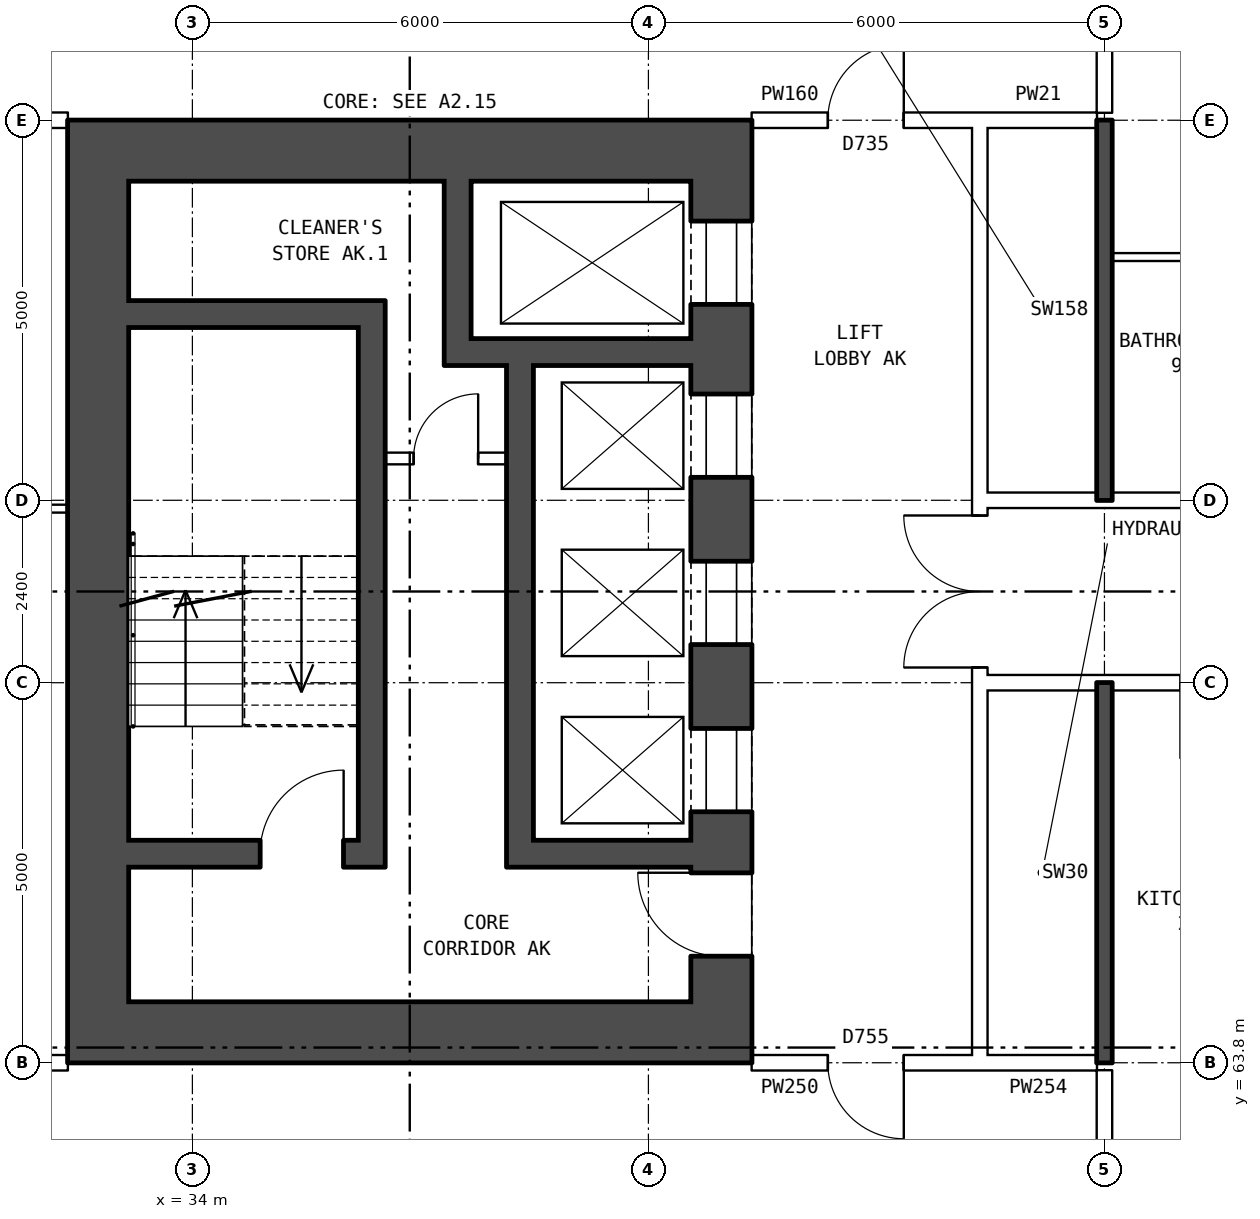
"""IFC4 building model, lengths in metres.
Left out: names, types, materials, properties, quantities, classifications, styles, units other than length and angle.
Written with IfcOpenShell. Run it as: python <this file> out.ifc"""

import sys

from ifc_helpers import new_model, si_unit, direction, frame, frame_2d, origin, place, context, subcontext, project, spatial, rectangle, extrude, element, fill, save


model = new_model("IFC4")
c1 = context("Model", 3, precision=1e-05, world=origin(), true_north=direction((0.0, 1.0)))
c2 = subcontext(c1, "Body", "Model", "MODEL_VIEW")
j1 = project(units=[si_unit("LENGTHUNIT", "METRE"), si_unit("PLANEANGLEUNIT", "RADIAN")], contexts=[c1])
p1 = place(None, origin())
s1 = spatial("IfcSite", under=j1, at=p1, CompositionType="ELEMENT")
p2 = place(p1, origin())
s2 = spatial("IfcBuilding", under=s1, at=p2, CompositionType="ELEMENT")
p3 = place(p2, frame((0.0, 0.0, 53.6)))
s3 = spatial("IfcBuildingStorey", under=s2, at=p3, CompositionType="ELEMENT", Elevation=53.6)
p4 = place(p3, frame((40.96, 75.4, 0.0), z_axis=(0.0, 0.0, 1.0), x_axis=(0.0, -1.0, 0.0)))
e1 = element("IfcWall", 1, at=p4, inside=s3, PredefinedType="SHEAR", context=c2, shape_type="SweptSolid", body=[
    extrude(rectangle(XDim=10.8, YDim=0.8, at=frame_2d((5.4, 0.0))), origin(), (0.0, 0.0, 1.0), 2.85),
])
p5 = place(p4, frame((0.525, 0.0, 0.0)))
e2 = element("IfcOpeningElement", 2, at=p5, cuts=e1, PredefinedType="OPENING", context=c2, shape_type="SweptSolid", body=[
    extrude(rectangle(XDim=1.1, YDim=2.1, at=frame_2d((0.55, 1.05))), frame((0.0, 0.41, 0.0), z_axis=(0.0, -1.0, 0.0), x_axis=(1.0, 0.0, 0.0)), (0.0, 0.0, 1.0), 0.82),
])
p6 = place(p4, frame((2.8, 0.0, 0.0)))
e3 = element("IfcOpeningElement", 3, at=p6, cuts=e1, PredefinedType="OPENING", context=c2, shape_type="SweptSolid", body=[
    extrude(rectangle(XDim=1.1, YDim=2.1, at=frame_2d((0.55, 1.05))), frame((0.0, 0.41, 0.0), z_axis=(0.0, -1.0, 0.0), x_axis=(1.0, 0.0, 0.0)), (0.0, 0.0, 1.0), 0.82),
])
p7 = place(p4, frame((5.0, 0.0, 0.0)))
e4 = element("IfcOpeningElement", 4, at=p7, cuts=e1, PredefinedType="OPENING", context=c2, shape_type="SweptSolid", body=[
    extrude(rectangle(XDim=1.1, YDim=2.1, at=frame_2d((0.55, 1.05))), frame((0.0, 0.41, 0.0), z_axis=(0.0, -1.0, 0.0), x_axis=(1.0, 0.0, 0.0)), (0.0, 0.0, 1.0), 0.82),
])
p8 = place(p4, frame((7.2, 0.0, 0.0)))
e5 = element("IfcOpeningElement", 5, at=p8, cuts=e1, PredefinedType="OPENING", context=c2, shape_type="SweptSolid", body=[
    extrude(rectangle(XDim=1.1, YDim=2.1, at=frame_2d((0.55, 1.05))), frame((0.0, 0.41, 0.0), z_axis=(0.0, -1.0, 0.0), x_axis=(1.0, 0.0, 0.0)), (0.0, 0.0, 1.0), 0.82),
])
p9 = place(p4, frame((9.1, 0.0, 0.0)))
e6 = element("IfcOpeningElement", 6, at=p9, cuts=e1, PredefinedType="OPENING", context=c2, shape_type="SweptSolid", body=[
    extrude(rectangle(XDim=1.1, YDim=2.1, at=frame_2d((0.55, 1.05))), frame((0.0, 0.41, 0.0), z_axis=(0.0, -1.0, 0.0), x_axis=(1.0, 0.0, 0.0)), (0.0, 0.0, 1.0), 0.82),
])
p10 = place(p3, frame((32.76, 75.4, 0.0), z_axis=(0.0, 0.0, 1.0), x_axis=(0.0, -1.0, 0.0)))
e7 = element("IfcWall", 7, at=p10, inside=s3, PredefinedType="SHEAR", context=c2, shape_type="SweptSolid", body=[
    extrude(rectangle(XDim=10.8, YDim=0.8, at=frame_2d((5.4, 0.0))), origin(), (0.0, 0.0, 1.0), 2.85),
])
for number, where, z_axis, x_axis in (
    (8, (41.36, 75.8, 0.0), (0.0, 0.0, 1.0), (-1.0, 0.0, 0.0)),
    (9, (41.36, 64.2, 0.0), (0.0, 0.0, 1.0), (-1.0, 0.0, 0.0)),
):
    element("IfcWall", number, at=place(p3, frame(where, z_axis=z_axis, x_axis=x_axis)), inside=s3, PredefinedType="SHEAR", context=c2, shape_type="SweptSolid", body=[
        extrude(rectangle(XDim=9.0, YDim=0.8, at=frame_2d((4.5, 0.0))), origin(), (0.0, 0.0, 1.0), 2.85),
    ])
p11 = place(p3, frame((36.185, 73.65, 0.0), z_axis=(0.0, 0.0, 1.0), x_axis=(-1.0, 0.0, 0.0)))
e10 = element("IfcWall", 10, at=p11, inside=s3, PredefinedType="SHEAR", context=c2, shape_type="SweptSolid", body=[
    extrude(rectangle(XDim=3.025, YDim=0.35, at=frame_2d((1.513, 0.0))), origin(), (0.0, 0.0, 1.0), 2.85),
])
p12 = place(p3, frame((40.56, 73.15, 0.0), z_axis=(0.0, 0.0, 1.0), x_axis=(-1.0, 0.0, 0.0)))
e11 = element("IfcWall", 11, at=p12, inside=s3, PredefinedType="SHEAR", context=c2, shape_type="SweptSolid", body=[
    extrude(rectangle(XDim=3.245, YDim=0.35, at=frame_2d((1.623, 0.0))), origin(), (0.0, 0.0, 1.0), 2.85),
])
p13 = place(p3, frame((38.135, 71.75, 0.0), z_axis=(0.0, 0.0, 1.0), x_axis=(-1.0, 0.0, 0.0)))
e12 = element("IfcWall", 12, at=p13, inside=s3, PredefinedType="PARTITIONING", context=c2, shape_type="SweptSolid", body=[
    extrude(rectangle(XDim=1.6, YDim=0.15, at=frame_2d((0.8, 0.0))), origin(), (0.0, 0.0, 1.0), 2.85),
])
p14 = place(p13, frame((0.375, 0.0, 0.0)))
e13 = element("IfcOpeningElement", 13, at=p14, cuts=e12, PredefinedType="OPENING", context=c2, shape_type="SweptSolid", body=[
    extrude(rectangle(XDim=0.85, YDim=2.1, at=frame_2d((0.425, 1.05))), frame((0.0, 0.085, 0.0), z_axis=(0.0, -1.0, 0.0), x_axis=(1.0, 0.0, 0.0)), (0.0, 0.0, 1.0), 0.17),
])
p15 = place(p3, frame((40.56, 66.55, 0.0), z_axis=(0.0, 0.0, 1.0), x_axis=(-1.0, 0.0, 0.0)))
e14 = element("IfcWall", 14, at=p15, inside=s3, PredefinedType="SHEAR", context=c2, shape_type="SweptSolid", body=[
    extrude(rectangle(XDim=2.075, YDim=0.35, at=frame_2d((1.038, 0.0))), origin(), (0.0, 0.0, 1.0), 2.85),
])
p16 = place(p3, frame((36.185, 66.55, 0.0), z_axis=(0.0, 0.0, 1.0), x_axis=(-1.0, 0.0, 0.0)))
e15 = element("IfcWall", 15, at=p16, inside=s3, PredefinedType="SHEAR", context=c2, shape_type="SweptSolid", body=[
    extrude(rectangle(XDim=3.025, YDim=0.35, at=frame_2d((1.513, 0.0))), origin(), (0.0, 0.0, 1.0), 2.85),
])
p17 = place(p16, frame((0.195, 0.0, 0.0)))
e16 = element("IfcOpeningElement", 16, at=p17, cuts=e15, PredefinedType="OPENING", context=c2, shape_type="SweptSolid", body=[
    extrude(rectangle(XDim=1.1, YDim=2.1, at=frame_2d((0.55, 1.05))), frame((0.0, 0.185, 0.0), z_axis=(0.0, -1.0, 0.0), x_axis=(1.0, 0.0, 0.0)), (0.0, 0.0, 1.0), 0.37),
])
p18 = place(p3, frame((38.31, 72.975, 0.0), z_axis=(0.0, 0.0, 1.0), x_axis=(0.0, -1.0, 0.0)))
e17 = element("IfcWall", 17, at=p18, inside=s3, PredefinedType="SHEAR", context=c2, shape_type="SweptSolid", body=[
    extrude(rectangle(XDim=6.6, YDim=0.35, at=frame_2d((3.3, 0.0))), origin(), (0.0, 0.0, 1.0), 2.85),
])
p19 = place(p3, frame((37.49, 75.4, 0.0), z_axis=(0.0, 0.0, 1.0), x_axis=(0.0, -1.0, 0.0)))
e18 = element("IfcWall", 18, at=p19, inside=s3, PredefinedType="SHEAR", context=c2, shape_type="SweptSolid", body=[
    extrude(rectangle(XDim=2.075, YDim=0.35, at=frame_2d((1.038, 0.0))), origin(), (0.0, 0.0, 1.0), 2.85),
])
p20 = place(p3, frame((36.36, 73.825, 0.0), z_axis=(0.0, 0.0, 1.0), x_axis=(0.0, -1.0, 0.0)))
e19 = element("IfcWall", 19, at=p20, inside=s3, PredefinedType="SHEAR", context=c2, shape_type="SweptSolid", body=[
    extrude(rectangle(XDim=7.45, YDim=0.35, at=frame_2d((3.725, 0.0))), origin(), (0.0, 0.0, 1.0), 2.85),
])
p21 = place(p3, frame((44.36, 63.9, 0.0), z_axis=(0.0, 0.0, 1.0), x_axis=(0.0, 1.0, 0.0)))
e20 = element("IfcWall", 20, at=p21, inside=s3, PredefinedType="PARTITIONING", context=c2, shape_type="SweptSolid", body=[
    extrude(rectangle(XDim=12.2, YDim=0.2, at=frame_2d((6.1, 0.0))), origin(), (0.0, 0.0, 1.0), 2.85),
])
p22 = place(p21, frame((5.1, 0.0, 0.0)))
e21 = element("IfcOpeningElement", 21, at=p22, cuts=e20, PredefinedType="OPENING", context=c2, shape_type="SweptSolid", body=[
    extrude(rectangle(XDim=2.0, YDim=2.1, at=frame_2d((1.0, 1.05))), frame((0.0, 0.11, 0.0), z_axis=(0.0, -1.0, 0.0), x_axis=(1.0, 0.0, 0.0)), (0.0, 0.0, 1.0), 0.22),
])
p23 = place(p3, frame((24.26, 63.8, 0.0), z_axis=(0.0, 0.0, 1.0), x_axis=(1.0, 0.0, 0.0)))
e22 = element("IfcWall", 22, at=p23, inside=s3, PredefinedType="PARTITIONING", context=c2, shape_type="SweptSolid", body=[
    extrude(rectangle(XDim=8.1, YDim=0.2, at=frame_2d((4.05, 0.0))), origin(), (0.0, 0.0, 1.0), 2.85),
])
p24 = place(p23, frame((5.52, 0.0, 0.0)))
e23 = element("IfcOpeningElement", 23, at=p24, cuts=e22, PredefinedType="OPENING", context=c2, shape_type="SweptSolid", body=[
    extrude(rectangle(XDim=0.8, YDim=2.1, at=frame_2d((0.4, 1.05))), frame((0.0, 0.11, 0.0), z_axis=(0.0, -1.0, 0.0), x_axis=(1.0, 0.0, 0.0)), (0.0, 0.0, 1.0), 0.22),
])
p25 = place(p3, frame((41.36, 63.8, 0.0), z_axis=(0.0, 0.0, 1.0), x_axis=(1.0, 0.0, 0.0)))
e24 = element("IfcWall", 24, at=p25, inside=s3, PredefinedType="PARTITIONING", context=c2, shape_type="SweptSolid", body=[
    extrude(rectangle(XDim=3.0, YDim=0.2, at=frame_2d((1.5, 0.0))), origin(), (0.0, 0.0, 1.0), 2.85),
])
p26 = place(p25, frame((1.0, 0.0, 0.0)))
e25 = element("IfcOpeningElement", 25, at=p26, cuts=e24, PredefinedType="OPENING", context=c2, shape_type="SweptSolid", body=[
    extrude(rectangle(XDim=1.0, YDim=2.1, at=frame_2d((0.5, 1.05))), frame((0.0, 0.11, 0.0), z_axis=(0.0, -1.0, 0.0), x_axis=(1.0, 0.0, 0.0)), (0.0, 0.0, 1.0), 0.22),
])
p27 = place(p3, frame((44.36, 63.8, 0.0), z_axis=(0.0, 0.0, 1.0), x_axis=(1.0, 0.0, 0.0)))
e26 = element("IfcWall", 26, at=p27, inside=s3, PredefinedType="PARTITIONING", context=c2, shape_type="SweptSolid", body=[
    extrude(rectangle(XDim=1.54, YDim=0.2, at=frame_2d((0.77, 0.0))), origin(), (0.0, 0.0, 1.0), 2.85),
])
p28 = place(p3, frame((44.36, 68.8, 0.0), z_axis=(0.0, 0.0, 1.0), x_axis=(1.0, 0.0, 0.0)))
e27 = element("IfcWall", 27, at=p28, inside=s3, PredefinedType="PARTITIONING", context=c2, shape_type="SweptSolid", body=[
    extrude(rectangle(XDim=19.28, YDim=0.2, at=frame_2d((9.64, 0.0))), origin(), (0.0, 0.0, 1.0), 2.85),
])
p29 = place(p28, frame((17.46, 0.0, 0.0)))
e28 = element("IfcOpeningElement", 28, at=p29, cuts=e27, PredefinedType="OPENING", context=c2, shape_type="SweptSolid", body=[
    extrude(rectangle(XDim=1.0, YDim=2.1, at=frame_2d((0.5, 1.05))), frame((0.0, 0.11, 0.0), z_axis=(0.0, -1.0, 0.0), x_axis=(1.0, 0.0, 0.0)), (0.0, 0.0, 1.0), 0.22),
])
p30 = place(p28, frame((11.64, 0.0, 0.0)))
e29 = element("IfcOpeningElement", 29, at=p30, cuts=e27, PredefinedType="OPENING", context=c2, shape_type="SweptSolid", body=[
    extrude(rectangle(XDim=1.0, YDim=2.1, at=frame_2d((0.5, 1.05))), frame((0.0, 0.11, 0.0), z_axis=(0.0, -1.0, 0.0), x_axis=(1.0, 0.0, 0.0)), (0.0, 0.0, 1.0), 0.22),
])
p31 = place(p28, frame((2.64, 0.0, 0.0)))
e30 = element("IfcOpeningElement", 30, at=p31, cuts=e27, PredefinedType="OPENING", context=c2, shape_type="SweptSolid", body=[
    extrude(rectangle(XDim=1.0, YDim=2.1, at=frame_2d((0.5, 1.05))), frame((0.0, 0.11, 0.0), z_axis=(0.0, -1.0, 0.0), x_axis=(1.0, 0.0, 0.0)), (0.0, 0.0, 1.0), 0.22),
])
p32 = place(p3, frame((28.1, 71.09, 0.0), z_axis=(0.0, 0.0, 1.0), x_axis=(1.0, 0.0, 0.0)))
e31 = element("IfcWall", 31, at=p32, inside=s3, PredefinedType="PARTITIONING", context=c2, shape_type="SweptSolid", body=[
    extrude(rectangle(XDim=4.26, YDim=0.1, at=frame_2d((2.13, 0.0))), origin(), (0.0, 0.0, 1.0), 2.85),
])
p33 = place(p3, frame((44.36, 71.2, 0.0), z_axis=(0.0, 0.0, 1.0), x_axis=(1.0, 0.0, 0.0)))
e32 = element("IfcWall", 32, at=p33, inside=s3, PredefinedType="PARTITIONING", context=c2, shape_type="SweptSolid", body=[
    extrude(rectangle(XDim=19.28, YDim=0.2, at=frame_2d((9.64, 0.0))), origin(), (0.0, 0.0, 1.0), 2.85),
])
p34 = place(p33, frame((17.46, 0.0, 0.0)))
e33 = element("IfcOpeningElement", 33, at=p34, cuts=e32, PredefinedType="OPENING", context=c2, shape_type="SweptSolid", body=[
    extrude(rectangle(XDim=1.0, YDim=2.1, at=frame_2d((0.5, 1.05))), frame((0.0, 0.11, 0.0), z_axis=(0.0, -1.0, 0.0), x_axis=(1.0, 0.0, 0.0)), (0.0, 0.0, 1.0), 0.22),
])
p35 = place(p33, frame((8.64, 0.0, 0.0)))
e34 = element("IfcOpeningElement", 34, at=p35, cuts=e32, PredefinedType="OPENING", context=c2, shape_type="SweptSolid", body=[
    extrude(rectangle(XDim=1.0, YDim=2.1, at=frame_2d((0.5, 1.05))), frame((0.0, 0.11, 0.0), z_axis=(0.0, -1.0, 0.0), x_axis=(1.0, 0.0, 0.0)), (0.0, 0.0, 1.0), 0.22),
])
p36 = place(p33, frame((5.64, 0.0, 0.0)))
e35 = element("IfcOpeningElement", 35, at=p36, cuts=e32, PredefinedType="OPENING", context=c2, shape_type="SweptSolid", body=[
    extrude(rectangle(XDim=1.0, YDim=2.1, at=frame_2d((0.5, 1.05))), frame((0.0, 0.11, 0.0), z_axis=(0.0, -1.0, 0.0), x_axis=(1.0, 0.0, 0.0)), (0.0, 0.0, 1.0), 0.22),
])
p37 = place(p3, frame((46.1, 74.4, 0.0), z_axis=(0.0, 0.0, 1.0), x_axis=(1.0, 0.0, 0.0)))
e36 = element("IfcWall", 36, at=p37, inside=s3, PredefinedType="PARTITIONING", context=c2, shape_type="SweptSolid", body=[
    extrude(rectangle(XDim=2.9, YDim=0.1, at=frame_2d((1.45, 0.0))), origin(), (0.0, 0.0, 1.0), 2.85),
])
p38 = place(p3, frame((24.26, 76.2, 0.0), z_axis=(0.0, 0.0, 1.0), x_axis=(1.0, 0.0, 0.0)))
e37 = element("IfcWall", 37, at=p38, inside=s3, PredefinedType="PARTITIONING", context=c2, shape_type="SweptSolid", body=[
    extrude(rectangle(XDim=8.1, YDim=0.2, at=frame_2d((4.05, 0.0))), origin(), (0.0, 0.0, 1.0), 2.85),
])
p39 = place(p38, frame((5.52, 0.0, 0.0)))
e38 = element("IfcOpeningElement", 38, at=p39, cuts=e37, PredefinedType="OPENING", context=c2, shape_type="SweptSolid", body=[
    extrude(rectangle(XDim=0.8, YDim=2.1, at=frame_2d((0.4, 1.05))), frame((0.0, 0.11, 0.0), z_axis=(0.0, -1.0, 0.0), x_axis=(1.0, 0.0, 0.0)), (0.0, 0.0, 1.0), 0.22),
])
p40 = place(p3, frame((41.36, 76.2, 0.0), z_axis=(0.0, 0.0, 1.0), x_axis=(1.0, 0.0, 0.0)))
e39 = element("IfcWall", 39, at=p40, inside=s3, PredefinedType="PARTITIONING", context=c2, shape_type="SweptSolid", body=[
    extrude(rectangle(XDim=3.0, YDim=0.2, at=frame_2d((1.5, 0.0))), origin(), (0.0, 0.0, 1.0), 2.85),
])
p41 = place(p40, frame((1.0, 0.0, 0.0)))
e40 = element("IfcOpeningElement", 40, at=p41, cuts=e39, PredefinedType="OPENING", context=c2, shape_type="SweptSolid", body=[
    extrude(rectangle(XDim=1.0, YDim=2.1, at=frame_2d((0.5, 1.05))), frame((0.0, 0.11, 0.0), z_axis=(0.0, -1.0, 0.0), x_axis=(1.0, 0.0, 0.0)), (0.0, 0.0, 1.0), 0.22),
])
p42 = place(p3, frame((44.36, 76.2, 0.0), z_axis=(0.0, 0.0, 1.0), x_axis=(1.0, 0.0, 0.0)))
e41 = element("IfcWall", 41, at=p42, inside=s3, PredefinedType="PARTITIONING", context=c2, shape_type="SweptSolid", body=[
    extrude(rectangle(XDim=1.54, YDim=0.2, at=frame_2d((0.77, 0.0))), origin(), (0.0, 0.0, 1.0), 2.85),
])
p43 = place(p3, frame((46.0, 61.5, 0.0), z_axis=(0.0, 0.0, 1.0), x_axis=(0.0, 1.0, 0.0)))
e42 = element("IfcWall", 42, at=p43, inside=s3, PredefinedType="PARTITIONING", context=c2, shape_type="SweptSolid", body=[
    extrude(rectangle(XDim=2.2, YDim=0.2, at=frame_2d((1.1, 0.0))), origin(), (0.0, 0.0, 1.0), 2.85),
])
for number, where, z_axis, x_axis in (
    (43, (46.0, 63.8, 0.0), (0.0, 0.0, 1.0), (0.0, 1.0, 0.0)),
    (44, (46.0, 71.2, 0.0), (0.0, 0.0, 1.0), (0.0, 1.0, 0.0)),
):
    element("IfcWall", number, at=place(p3, frame(where, z_axis=z_axis, x_axis=x_axis)), inside=s3, PredefinedType="SOLIDWALL", context=c2, shape_type="SweptSolid", body=[
        extrude(rectangle(XDim=5.0, YDim=0.2, at=frame_2d((2.5, 0.0))), origin(), (0.0, 0.0, 1.0), 2.85),
    ])
p44 = place(p3, frame((46.0, 76.3, 0.0), z_axis=(0.0, 0.0, 1.0), x_axis=(0.0, 1.0, 0.0)))
e45 = element("IfcWall", 45, at=p44, inside=s3, PredefinedType="PARTITIONING", context=c2, shape_type="SweptSolid", body=[
    extrude(rectangle(XDim=2.2, YDim=0.2, at=frame_2d((1.1, 0.0))), origin(), (0.0, 0.0, 1.0), 2.85),
])
p45 = place(p5, origin())
e46 = element("IfcDoor", 46, at=p45, inside=s3, OperationType="DOUBLE_DOOR_SLIDING", PredefinedType="DOOR", context=c2, shape_type="SweptSolid", body=[
    extrude(rectangle(XDim=1.1, YDim=2.1, at=frame_2d((0.55, 1.05))), frame((0.0, -0.335, 0.0), z_axis=(0.0, -1.0, 0.0), x_axis=(1.0, 0.0, 0.0)), (0.0, 0.0, 1.0), 0.05),
])
fill(e2, e46)
p46 = place(p6, origin())
e47 = element("IfcDoor", 47, at=p46, inside=s3, OperationType="DOUBLE_DOOR_SLIDING", PredefinedType="DOOR", context=c2, shape_type="SweptSolid", body=[
    extrude(rectangle(XDim=1.1, YDim=2.1, at=frame_2d((0.55, 1.05))), frame((0.0, -0.335, 0.0), z_axis=(0.0, -1.0, 0.0), x_axis=(1.0, 0.0, 0.0)), (0.0, 0.0, 1.0), 0.05),
])
fill(e3, e47)
p47 = place(p7, origin())
e48 = element("IfcDoor", 48, at=p47, inside=s3, OperationType="DOUBLE_DOOR_SLIDING", PredefinedType="DOOR", context=c2, shape_type="SweptSolid", body=[
    extrude(rectangle(XDim=1.1, YDim=2.1, at=frame_2d((0.55, 1.05))), frame((0.0, -0.335, 0.0), z_axis=(0.0, -1.0, 0.0), x_axis=(1.0, 0.0, 0.0)), (0.0, 0.0, 1.0), 0.05),
])
fill(e4, e48)
p48 = place(p8, origin())
e49 = element("IfcDoor", 49, at=p48, inside=s3, OperationType="DOUBLE_DOOR_SLIDING", PredefinedType="DOOR", context=c2, shape_type="SweptSolid", body=[
    extrude(rectangle(XDim=1.1, YDim=2.1, at=frame_2d((0.55, 1.05))), frame((0.0, -0.335, 0.0), z_axis=(0.0, -1.0, 0.0), x_axis=(1.0, 0.0, 0.0)), (0.0, 0.0, 1.0), 0.05),
])
fill(e5, e49)
p49 = place(p9, frame((1.1, 0.0, 0.0), z_axis=(0.0, 0.0, 1.0), x_axis=(-1.0, 0.0, 0.0)))
e50 = element("IfcDoor", 50, at=p49, inside=s3, OperationType="SINGLE_SWING_RIGHT", PredefinedType="DOOR", context=c2, shape_type="SweptSolid", body=[
    extrude(rectangle(XDim=1.1, YDim=2.1, at=frame_2d((0.55, 1.05))), frame((0.0, 0.385, 0.0), z_axis=(0.0, -1.0, 0.0), x_axis=(1.0, 0.0, 0.0)), (0.0, 0.0, 1.0), 0.05),
])
fill(e6, e50)
p50 = place(p17, frame((1.1, 0.0, 0.0), z_axis=(0.0, 0.0, 1.0), x_axis=(-1.0, 0.0, 0.0)))
e51 = element("IfcDoor", 51, at=p50, inside=s3, OperationType="SINGLE_SWING_RIGHT", PredefinedType="DOOR", context=c2, shape_type="SweptSolid", body=[
    extrude(rectangle(XDim=1.1, YDim=2.1, at=frame_2d((0.55, 1.05))), frame((0.0, 0.025, 0.0), z_axis=(0.0, -1.0, 0.0), x_axis=(1.0, 0.0, 0.0)), (0.0, 0.0, 1.0), 0.05),
])
fill(e16, e51)
p51 = place(p14, frame((0.85, 0.0, 0.0), z_axis=(0.0, 0.0, 1.0), x_axis=(-1.0, 0.0, 0.0)))
e52 = element("IfcDoor", 52, at=p51, inside=s3, OperationType="SINGLE_SWING_RIGHT", PredefinedType="DOOR", context=c2, shape_type="SweptSolid", body=[
    extrude(rectangle(XDim=0.85, YDim=2.1, at=frame_2d((0.425, 1.05))), frame((0.0, 0.025, 0.0), z_axis=(0.0, -1.0, 0.0), x_axis=(1.0, 0.0, 0.0)), (0.0, 0.0, 1.0), 0.05),
])
fill(e13, e52)
p52 = place(p22, origin())
e53 = element("IfcDoor", 53, at=p52, inside=s3, OperationType="DOUBLE_DOOR_SINGLE_SWING", PredefinedType="DOOR", context=c2, shape_type="SweptSolid", body=[
    extrude(rectangle(XDim=2.0, YDim=2.1, at=frame_2d((1.0, 1.05))), frame((0.0, 0.025, 0.0), z_axis=(0.0, -1.0, 0.0), x_axis=(1.0, 0.0, 0.0)), (0.0, 0.0, 1.0), 0.05),
])
fill(e21, e53)
p53 = place(p26, frame((1.0, 0.0, 0.0), z_axis=(0.0, 0.0, 1.0), x_axis=(-1.0, 0.0, 0.0)))
e54 = element("IfcDoor", 54, at=p53, inside=s3, OperationType="SINGLE_SWING_LEFT", PredefinedType="DOOR", context=c2, shape_type="SweptSolid", body=[
    extrude(rectangle(XDim=1.0, YDim=2.1, at=frame_2d((0.5, 1.05))), frame((0.0, 0.025, 0.0), z_axis=(0.0, -1.0, 0.0), x_axis=(1.0, 0.0, 0.0)), (0.0, 0.0, 1.0), 0.05),
])
fill(e25, e54)
p54 = place(p41, origin())
e55 = element("IfcDoor", 55, at=p54, inside=s3, OperationType="SINGLE_SWING_RIGHT", PredefinedType="DOOR", context=c2, shape_type="SweptSolid", body=[
    extrude(rectangle(XDim=1.0, YDim=2.1, at=frame_2d((0.5, 1.05))), frame((0.0, 0.025, 0.0), z_axis=(0.0, -1.0, 0.0), x_axis=(1.0, 0.0, 0.0)), (0.0, 0.0, 1.0), 0.05),
])
fill(e40, e55)
save(model, sys.argv[1])
